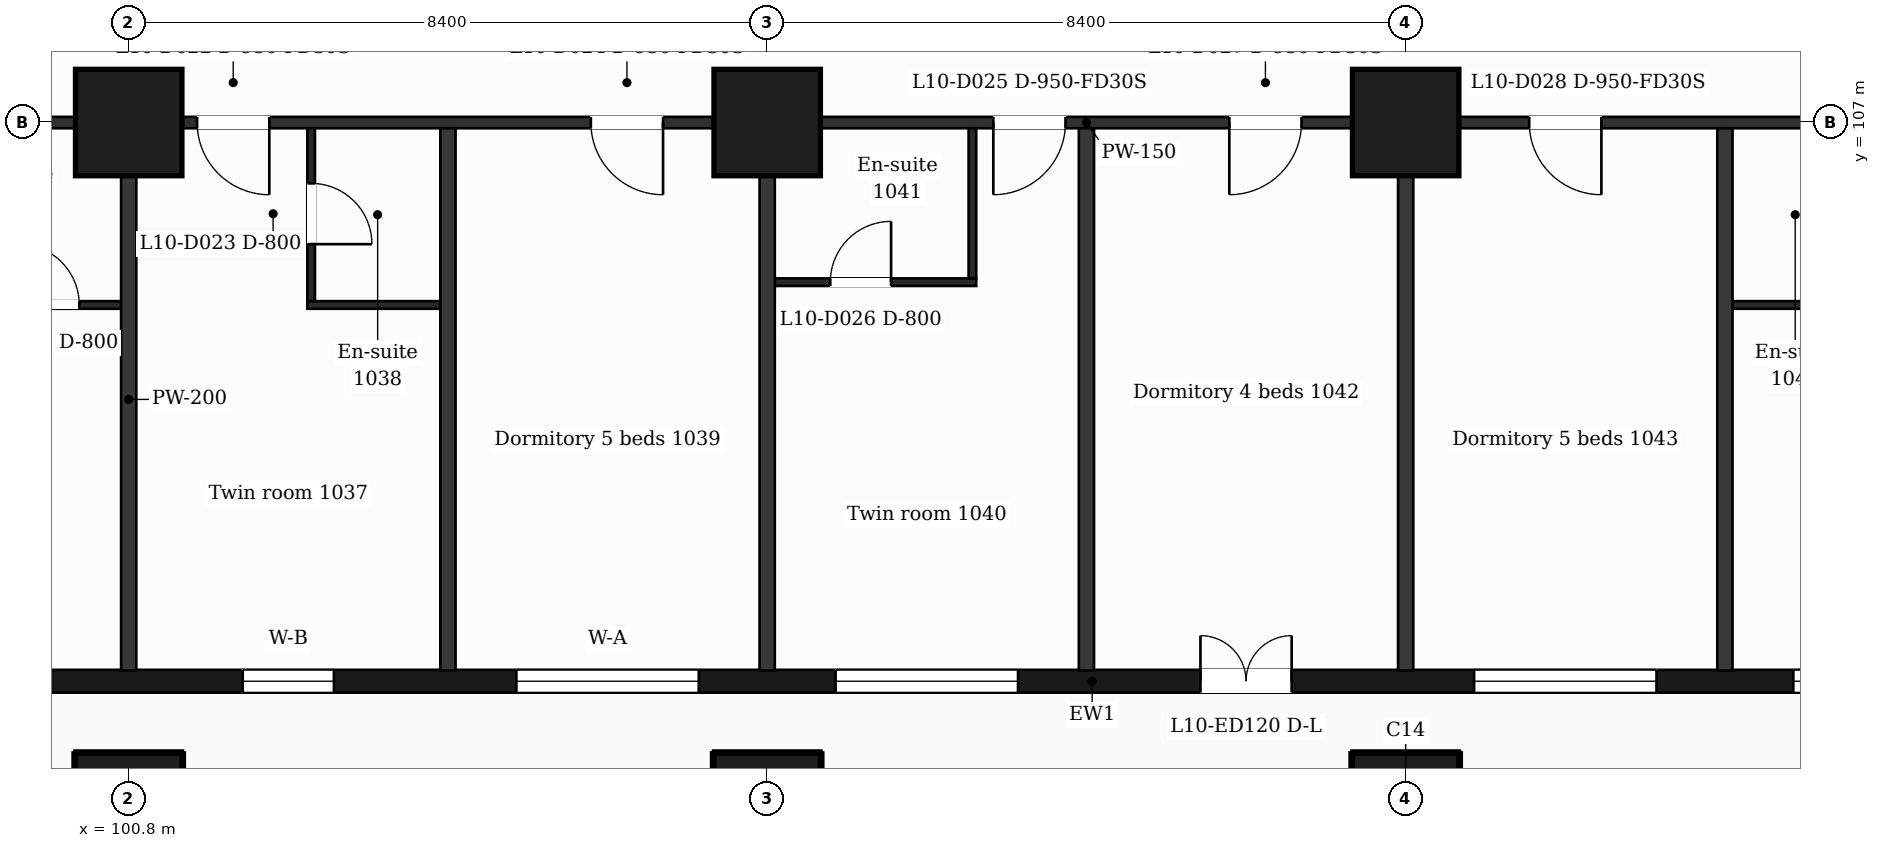
"""IFC4 building model, lengths in metres.
Left out: names, types, materials, properties, quantities, classifications, styles, units other than length and angle.
Written with IfcOpenShell. Run it as: python <this file> out.ifc"""

import sys

from ifc_helpers import new_model, si_unit, direction, frame, frame_2d, origin, origin_2d, place, context, subcontext, project, spatial, rectangle, extrude, element, fill, save


model = new_model("IFC4")
c1 = context("Model", 3, precision=1e-05, world=origin(), true_north=direction((0.0, 1.0)))
c2 = subcontext(c1, "Body", "Model", "MODEL_VIEW")
j1 = project(units=[si_unit("LENGTHUNIT", "METRE"), si_unit("PLANEANGLEUNIT", "RADIAN")], contexts=[c1])
p1 = place(None, origin())
s1 = spatial("IfcSite", under=j1, at=p1, CompositionType="ELEMENT")
p2 = place(p1, origin())
s2 = spatial("IfcBuilding", under=s1, at=p2, CompositionType="ELEMENT")
p3 = place(p2, frame((0.0, 0.0, 53.0)))
s3 = spatial("IfcBuildingStorey", under=s2, at=p3, CompositionType="ELEMENT", Elevation=53.0)
for number, where, z_axis, x_axis in (
    (1, (100.8, 98.0, 0.0), (0.0, 0.0, 1.0), (1.0, 0.0, 0.0)),
    (2, (109.2, 98.0, 0.0), (0.0, 0.0, 1.0), (1.0, 0.0, 0.0)),
    (3, (117.6, 98.0, 0.0), (0.0, 0.0, 1.0), (1.0, 0.0, 0.0)),
    (4, (100.8, 107.0, 0.0), (0.0, 0.0, 1.0), (1.0, 0.0, 0.0)),
    (5, (109.2, 107.0, 0.0), (0.0, 0.0, 1.0), (1.0, 0.0, 0.0)),
    (6, (117.6, 107.0, 0.0), (0.0, 0.0, 1.0), (1.0, 0.0, 0.0)),
):
    element("IfcColumn", number, at=place(p3, frame(where, z_axis=z_axis, x_axis=x_axis)), inside=s3, PredefinedType="COLUMN", context=c2, shape_type="SweptSolid", body=[
        extrude(rectangle(XDim=1.4, YDim=1.4, at=origin_2d()), origin(), (0.0, 0.0, 1.0), 3.5),
    ])
p4 = place(p3, frame((89.85, 99.65, 0.0), z_axis=(0.0, 0.0, 1.0), x_axis=(1.0, 0.0, 0.0)))
e7 = element("IfcWall", 7, at=p4, inside=s3, PredefinedType="SOLIDWALL", context=c2, shape_type="SweptSolid", body=[
    extrude(rectangle(XDim=47.25, YDim=0.3, at=frame_2d((23.625, 0.0))), origin(), (0.0, 0.0, 1.0), 3.18),
])
p5 = place(p4, frame((0.725, 0.0, 0.9)))
e8 = element("IfcOpeningElement", 8, at=p5, cuts=e7, PredefinedType="OPENING", context=c2, shape_type="SweptSolid", body=[
    extrude(rectangle(XDim=1.2, YDim=2.1, at=frame_2d((0.6, 1.05))), frame((0.0, 0.16, 0.0), z_axis=(0.0, -1.0, 0.0), x_axis=(1.0, 0.0, 0.0)), (0.0, 0.0, 1.0), 0.32),
])
p6 = place(p4, frame((3.45, 0.0, 0.9)))
e9 = element("IfcOpeningElement", 9, at=p6, cuts=e7, PredefinedType="OPENING", context=c2, shape_type="SweptSolid", body=[
    extrude(rectangle(XDim=2.4, YDim=2.1, at=frame_2d((1.2, 1.05))), frame((0.0, 0.16, 0.0), z_axis=(0.0, -1.0, 0.0), x_axis=(1.0, 0.0, 0.0)), (0.0, 0.0, 1.0), 0.32),
])
p7 = place(p4, frame((8.25, 0.0, 0.9)))
e10 = element("IfcOpeningElement", 10, at=p7, cuts=e7, PredefinedType="OPENING", context=c2, shape_type="SweptSolid", body=[
    extrude(rectangle(XDim=1.2, YDim=2.1, at=frame_2d((0.6, 1.05))), frame((0.0, 0.16, 0.0), z_axis=(0.0, -1.0, 0.0), x_axis=(1.0, 0.0, 0.0)), (0.0, 0.0, 1.0), 0.32),
])
p8 = place(p4, frame((12.45, 0.0, 0.9)))
e11 = element("IfcOpeningElement", 11, at=p8, cuts=e7, PredefinedType="OPENING", context=c2, shape_type="SweptSolid", body=[
    extrude(rectangle(XDim=1.2, YDim=2.1, at=frame_2d((0.6, 1.05))), frame((0.0, 0.16, 0.0), z_axis=(0.0, -1.0, 0.0), x_axis=(1.0, 0.0, 0.0)), (0.0, 0.0, 1.0), 0.32),
])
p9 = place(p4, frame((16.05, 0.0, 0.9)))
e12 = element("IfcOpeningElement", 12, at=p9, cuts=e7, PredefinedType="OPENING", context=c2, shape_type="SweptSolid", body=[
    extrude(rectangle(XDim=2.4, YDim=2.1, at=frame_2d((1.2, 1.05))), frame((0.0, 0.16, 0.0), z_axis=(0.0, -1.0, 0.0), x_axis=(1.0, 0.0, 0.0)), (0.0, 0.0, 1.0), 0.32),
])
p10 = place(p4, frame((20.25, 0.0, 0.9)))
e13 = element("IfcOpeningElement", 13, at=p10, cuts=e7, PredefinedType="OPENING", context=c2, shape_type="SweptSolid", body=[
    extrude(rectangle(XDim=2.4, YDim=2.1, at=frame_2d((1.2, 1.05))), frame((0.0, 0.16, 0.0), z_axis=(0.0, -1.0, 0.0), x_axis=(1.0, 0.0, 0.0)), (0.0, 0.0, 1.0), 0.32),
])
p11 = place(p4, frame((25.05, 0.0, 0.0)))
e14 = element("IfcOpeningElement", 14, at=p11, cuts=e7, PredefinedType="OPENING", context=c2, shape_type="SweptSolid", body=[
    extrude(rectangle(XDim=1.2, YDim=2.4, at=frame_2d((0.6, 1.2))), frame((0.0, 0.16, 0.0), z_axis=(0.0, -1.0, 0.0), x_axis=(1.0, 0.0, 0.0)), (0.0, 0.0, 1.0), 0.32),
])
p12 = place(p4, frame((28.65, 0.0, 0.9)))
e15 = element("IfcOpeningElement", 15, at=p12, cuts=e7, PredefinedType="OPENING", context=c2, shape_type="SweptSolid", body=[
    extrude(rectangle(XDim=2.4, YDim=2.1, at=frame_2d((1.2, 1.05))), frame((0.0, 0.16, 0.0), z_axis=(0.0, -1.0, 0.0), x_axis=(1.0, 0.0, 0.0)), (0.0, 0.0, 1.0), 0.32),
])
p13 = place(p4, frame((32.85, 0.0, 0.9)))
e16 = element("IfcOpeningElement", 16, at=p13, cuts=e7, PredefinedType="OPENING", context=c2, shape_type="SweptSolid", body=[
    extrude(rectangle(XDim=2.4, YDim=2.1, at=frame_2d((1.2, 1.05))), frame((0.0, 0.16, 0.0), z_axis=(0.0, -1.0, 0.0), x_axis=(1.0, 0.0, 0.0)), (0.0, 0.0, 1.0), 0.32),
])
p14 = place(p4, frame((37.65, 0.0, 0.9)))
e17 = element("IfcOpeningElement", 17, at=p14, cuts=e7, PredefinedType="OPENING", context=c2, shape_type="SweptSolid", body=[
    extrude(rectangle(XDim=1.2, YDim=2.1, at=frame_2d((0.6, 1.05))), frame((0.0, 0.16, 0.0), z_axis=(0.0, -1.0, 0.0), x_axis=(1.0, 0.0, 0.0)), (0.0, 0.0, 1.0), 0.32),
])
p15 = place(p4, frame((41.85, 0.0, 0.9)))
e18 = element("IfcOpeningElement", 18, at=p15, cuts=e7, PredefinedType="OPENING", context=c2, shape_type="SweptSolid", body=[
    extrude(rectangle(XDim=1.2, YDim=2.1, at=frame_2d((0.6, 1.05))), frame((0.0, 0.16, 0.0), z_axis=(0.0, -1.0, 0.0), x_axis=(1.0, 0.0, 0.0)), (0.0, 0.0, 1.0), 0.32),
])
p16 = place(p4, frame((45.25, 0.0, 0.9)))
e19 = element("IfcOpeningElement", 19, at=p16, cuts=e7, PredefinedType="OPENING", context=c2, shape_type="SweptSolid", body=[
    extrude(rectangle(XDim=1.2, YDim=2.1, at=frame_2d((0.6, 1.05))), frame((0.0, 0.16, 0.0), z_axis=(0.0, -1.0, 0.0), x_axis=(1.0, 0.0, 0.0)), (0.0, 0.0, 1.0), 0.32),
])
p17 = place(p3, frame((98.05, 104.6, 0.0), z_axis=(0.0, 0.0, 1.0), x_axis=(1.0, 0.0, 0.0)))
e20 = element("IfcWall", 20, at=p17, inside=s3, PredefinedType="PARTITIONING", context=c2, shape_type="SweptSolid", body=[
    extrude(rectangle(XDim=2.75, YDim=0.1, at=frame_2d((1.375, 0.0))), origin(), (0.0, 0.0, 1.0), 3.18),
])
p18 = place(p17, frame((1.3, 0.0, 0.0)))
e21 = element("IfcOpeningElement", 21, at=p18, cuts=e20, PredefinedType="OPENING", context=c2, shape_type="SweptSolid", body=[
    extrude(rectangle(XDim=0.8, YDim=2.1, at=frame_2d((0.4, 1.05))), frame((0.0, 0.06, 0.0), z_axis=(0.0, -1.0, 0.0), x_axis=(1.0, 0.0, 0.0)), (0.0, 0.0, 1.0), 0.12),
])
p19 = place(p3, frame((103.15, 104.6, 0.0), z_axis=(0.0, 0.0, 1.0), x_axis=(1.0, 0.0, 0.0)))
e22 = element("IfcWall", 22, at=p19, inside=s3, PredefinedType="PARTITIONING", context=c2, shape_type="SweptSolid", body=[
    extrude(rectangle(XDim=1.85, YDim=0.1, at=frame_2d((0.925, 0.0))), origin(), (0.0, 0.0, 1.0), 3.18),
])
p20 = place(p3, frame((121.8, 104.6, 0.0), z_axis=(0.0, 0.0, 1.0), x_axis=(1.0, 0.0, 0.0)))
e23 = element("IfcWall", 23, at=p20, inside=s3, PredefinedType="PARTITIONING", context=c2, shape_type="SweptSolid", body=[
    extrude(rectangle(XDim=1.85, YDim=0.1, at=frame_2d((0.925, 0.0))), origin(), (0.0, 0.0, 1.0), 3.18),
])
p21 = place(p3, frame((109.2, 104.9, 0.0), z_axis=(0.0, 0.0, 1.0), x_axis=(1.0, 0.0, 0.0)))
e24 = element("IfcWall", 24, at=p21, inside=s3, PredefinedType="PARTITIONING", context=c2, shape_type="SweptSolid", body=[
    extrude(rectangle(XDim=2.75, YDim=0.1, at=frame_2d((1.375, 0.0))), origin(), (0.0, 0.0, 1.0), 3.18),
])
p22 = place(p21, frame((0.83, 0.0, 0.0)))
e25 = element("IfcOpeningElement", 25, at=p22, cuts=e24, PredefinedType="OPENING", context=c2, shape_type="SweptSolid", body=[
    extrude(rectangle(XDim=0.8, YDim=2.1, at=frame_2d((0.4, 1.05))), frame((0.0, 0.06, 0.0), z_axis=(0.0, -1.0, 0.0), x_axis=(1.0, 0.0, 0.0)), (0.0, 0.0, 1.0), 0.12),
])
p23 = place(p3, frame((87.018, 107.0, 0.0), z_axis=(0.0, 0.0, 1.0), x_axis=(1.0, 0.0, 0.0)))
e26 = element("IfcWall", 26, at=p23, inside=s3, PredefinedType="PARTITIONING", context=c2, shape_type="SweptSolid", body=[
    extrude(rectangle(XDim=52.765, YDim=0.15, at=frame_2d((26.382, 0.0))), origin(), (0.0, 0.0, 1.0), 3.18),
])
p24 = place(p23, frame((0.87, 0.0, 0.0)))
e27 = element("IfcOpeningElement", 27, at=p24, cuts=e26, PredefinedType="OPENING", context=c2, shape_type="SweptSolid", body=[
    extrude(rectangle(XDim=0.95, YDim=2.1, at=frame_2d((0.475, 1.05))), frame((0.0, 0.085, 0.0), z_axis=(0.0, -1.0, 0.0), x_axis=(1.0, 0.0, 0.0)), (0.0, 0.0, 1.0), 0.17),
])
p25 = place(p23, frame((6.752, 0.0, 0.0)))
e28 = element("IfcOpeningElement", 28, at=p25, cuts=e26, PredefinedType="OPENING", context=c2, shape_type="SweptSolid", body=[
    extrude(rectangle(XDim=0.95, YDim=2.1, at=frame_2d((0.475, 1.05))), frame((0.0, 0.085, 0.0), z_axis=(0.0, -1.0, 0.0), x_axis=(1.0, 0.0, 0.0)), (0.0, 0.0, 1.0), 0.17),
])
p26 = place(p23, frame((9.857, 0.0, 0.0)))
e29 = element("IfcOpeningElement", 29, at=p26, cuts=e26, PredefinedType="OPENING", context=c2, shape_type="SweptSolid", body=[
    extrude(rectangle(XDim=0.95, YDim=2.1, at=frame_2d((0.475, 1.05))), frame((0.0, 0.085, 0.0), z_axis=(0.0, -1.0, 0.0), x_axis=(1.0, 0.0, 0.0)), (0.0, 0.0, 1.0), 0.17),
])
p27 = place(p23, frame((14.682, 0.0, 0.0)))
e30 = element("IfcOpeningElement", 30, at=p27, cuts=e26, PredefinedType="OPENING", context=c2, shape_type="SweptSolid", body=[
    extrude(rectangle(XDim=0.95, YDim=2.1, at=frame_2d((0.475, 1.05))), frame((0.0, 0.085, 0.0), z_axis=(0.0, -1.0, 0.0), x_axis=(1.0, 0.0, 0.0)), (0.0, 0.0, 1.0), 0.17),
])
p28 = place(p23, frame((19.862, 0.0, 0.0)))
e31 = element("IfcOpeningElement", 31, at=p28, cuts=e26, PredefinedType="OPENING", context=c2, shape_type="SweptSolid", body=[
    extrude(rectangle(XDim=0.95, YDim=2.1, at=frame_2d((0.475, 1.05))), frame((0.0, 0.085, 0.0), z_axis=(0.0, -1.0, 0.0), x_axis=(1.0, 0.0, 0.0)), (0.0, 0.0, 1.0), 0.17),
])
p29 = place(p23, frame((25.157, 0.0, 0.0)))
e32 = element("IfcOpeningElement", 32, at=p29, cuts=e26, PredefinedType="OPENING", context=c2, shape_type="SweptSolid", body=[
    extrude(rectangle(XDim=0.95, YDim=2.1, at=frame_2d((0.475, 1.05))), frame((0.0, 0.085, 0.0), z_axis=(0.0, -1.0, 0.0), x_axis=(1.0, 0.0, 0.0)), (0.0, 0.0, 1.0), 0.17),
])
p30 = place(p23, frame((28.262, 0.0, 0.0)))
e33 = element("IfcOpeningElement", 33, at=p30, cuts=e26, PredefinedType="OPENING", context=c2, shape_type="SweptSolid", body=[
    extrude(rectangle(XDim=0.95, YDim=2.1, at=frame_2d((0.475, 1.05))), frame((0.0, 0.085, 0.0), z_axis=(0.0, -1.0, 0.0), x_axis=(1.0, 0.0, 0.0)), (0.0, 0.0, 1.0), 0.17),
])
p31 = place(p23, frame((32.207, 0.0, 0.0)))
e34 = element("IfcOpeningElement", 34, at=p31, cuts=e26, PredefinedType="OPENING", context=c2, shape_type="SweptSolid", body=[
    extrude(rectangle(XDim=0.95, YDim=2.1, at=frame_2d((0.475, 1.05))), frame((0.0, 0.085, 0.0), z_axis=(0.0, -1.0, 0.0), x_axis=(1.0, 0.0, 0.0)), (0.0, 0.0, 1.0), 0.17),
])
p32 = place(p23, frame((37.094, 0.0, 0.0)))
e35 = element("IfcOpeningElement", 35, at=p32, cuts=e26, PredefinedType="OPENING", context=c2, shape_type="SweptSolid", body=[
    extrude(rectangle(XDim=0.95, YDim=2.1, at=frame_2d((0.475, 1.05))), frame((0.0, 0.085, 0.0), z_axis=(0.0, -1.0, 0.0), x_axis=(1.0, 0.0, 0.0)), (0.0, 0.0, 1.0), 0.17),
])
p33 = place(p23, frame((43.045, 0.0, 0.0)))
e36 = element("IfcOpeningElement", 36, at=p33, cuts=e26, PredefinedType="OPENING", context=c2, shape_type="SweptSolid", body=[
    extrude(rectangle(XDim=0.95, YDim=2.1, at=frame_2d((0.475, 1.05))), frame((0.0, 0.085, 0.0), z_axis=(0.0, -1.0, 0.0), x_axis=(1.0, 0.0, 0.0)), (0.0, 0.0, 1.0), 0.17),
])
p34 = place(p23, frame((49.285, 0.0, 0.0)))
e37 = element("IfcOpeningElement", 37, at=p34, cuts=e26, PredefinedType="OPENING", context=c2, shape_type="SweptSolid", body=[
    extrude(rectangle(XDim=0.95, YDim=2.1, at=frame_2d((0.475, 1.05))), frame((0.0, 0.085, 0.0), z_axis=(0.0, -1.0, 0.0), x_axis=(1.0, 0.0, 0.0)), (0.0, 0.0, 1.0), 0.17),
])
p35 = place(p3, frame((100.8, 99.79, 0.0), z_axis=(0.0, 0.0, 1.0), x_axis=(0.0, 1.0, 0.0)))
e38 = element("IfcWall", 38, at=p35, inside=s3, PredefinedType="PARTITIONING", context=c2, shape_type="SweptSolid", body=[
    extrude(rectangle(XDim=7.135, YDim=0.2, at=frame_2d((3.567, 0.0))), origin(), (0.0, 0.0, 1.0), 3.18),
])
p36 = place(p3, frame((103.2, 104.65, 0.0), z_axis=(0.0, 0.0, 1.0), x_axis=(0.0, 1.0, 0.0)))
e39 = element("IfcWall", 39, at=p36, inside=s3, PredefinedType="PARTITIONING", context=c2, shape_type="SweptSolid", body=[
    extrude(rectangle(XDim=2.275, YDim=0.1, at=frame_2d((1.138, 0.0))), origin(), (0.0, 0.0, 1.0), 3.18),
])
p37 = place(p36, frame((0.75, 0.0, 0.0)))
e40 = element("IfcOpeningElement", 40, at=p37, cuts=e39, PredefinedType="OPENING", context=c2, shape_type="SweptSolid", body=[
    extrude(rectangle(XDim=0.8, YDim=2.1, at=frame_2d((0.4, 1.05))), frame((0.0, 0.06, 0.0), z_axis=(0.0, -1.0, 0.0), x_axis=(1.0, 0.0, 0.0)), (0.0, 0.0, 1.0), 0.12),
])
for number, where, z_axis, x_axis in (
    (41, (105.0, 99.79, 0.0), (0.0, 0.0, 1.0), (0.0, 1.0, 0.0)),
    (42, (109.2, 99.79, 0.0), (0.0, 0.0, 1.0), (0.0, 1.0, 0.0)),
):
    element("IfcWall", number, at=place(p3, frame(where, z_axis=z_axis, x_axis=x_axis)), inside=s3, PredefinedType="PARTITIONING", context=c2, shape_type="SweptSolid", body=[
        extrude(rectangle(XDim=7.135, YDim=0.2, at=frame_2d((3.567, 0.0))), origin(), (0.0, 0.0, 1.0), 3.18),
    ])
p38 = place(p3, frame((111.9, 104.95, 0.0), z_axis=(0.0, 0.0, 1.0), x_axis=(0.0, 1.0, 0.0)))
e43 = element("IfcWall", 43, at=p38, inside=s3, PredefinedType="PARTITIONING", context=c2, shape_type="SweptSolid", body=[
    extrude(rectangle(XDim=1.975, YDim=0.1, at=frame_2d((0.988, 0.0))), origin(), (0.0, 0.0, 1.0), 3.18),
])
for number, where, z_axis, x_axis in (
    (44, (113.4, 99.79, 0.0), (0.0, 0.0, 1.0), (0.0, 1.0, 0.0)),
    (45, (117.6, 99.79, 0.0), (0.0, 0.0, 1.0), (0.0, 1.0, 0.0)),
    (46, (121.8, 99.79, 0.0), (0.0, 0.0, 1.0), (0.0, 1.0, 0.0)),
):
    element("IfcWall", number, at=place(p3, frame(where, z_axis=z_axis, x_axis=x_axis)), inside=s3, PredefinedType="PARTITIONING", context=c2, shape_type="SweptSolid", body=[
        extrude(rectangle(XDim=7.135, YDim=0.2, at=frame_2d((3.567, 0.0))), origin(), (0.0, 0.0, 1.0), 3.18),
    ])
p39 = place(p8, origin())
e47 = element("IfcWindow", 47, at=p39, inside=s3, PartitioningType="SINGLE_PANEL", PredefinedType="WINDOW", context=c2, shape_type="SweptSolid", body=[
    extrude(rectangle(XDim=1.2, YDim=2.1, at=frame_2d((0.6, 1.05))), frame((0.0, 0.03, 0.0), z_axis=(0.0, -1.0, 0.0), x_axis=(1.0, 0.0, 0.0)), (0.0, 0.0, 1.0), 0.06),
])
fill(e11, e47)
p40 = place(p9, origin())
e48 = element("IfcWindow", 48, at=p40, inside=s3, PartitioningType="SINGLE_PANEL", PredefinedType="WINDOW", context=c2, shape_type="SweptSolid", body=[
    extrude(rectangle(XDim=2.4, YDim=2.1, at=frame_2d((1.2, 1.05))), frame((0.0, 0.03, 0.0), z_axis=(0.0, -1.0, 0.0), x_axis=(1.0, 0.0, 0.0)), (0.0, 0.0, 1.0), 0.06),
])
fill(e12, e48)
p41 = place(p10, origin())
e49 = element("IfcWindow", 49, at=p41, inside=s3, PartitioningType="SINGLE_PANEL", PredefinedType="WINDOW", context=c2, shape_type="SweptSolid", body=[
    extrude(rectangle(XDim=2.4, YDim=2.1, at=frame_2d((1.2, 1.05))), frame((0.0, 0.03, 0.0), z_axis=(0.0, -1.0, 0.0), x_axis=(1.0, 0.0, 0.0)), (0.0, 0.0, 1.0), 0.06),
])
fill(e13, e49)
p42 = place(p11, origin())
e50 = element("IfcDoor", 50, at=p42, inside=s3, OperationType="DOUBLE_DOOR_SINGLE_SWING", PredefinedType="DOOR", context=c2, shape_type="SweptSolid", body=[
    extrude(rectangle(XDim=1.2, YDim=2.4, at=frame_2d((0.6, 1.2))), frame((0.0, 0.025, 0.0), z_axis=(0.0, -1.0, 0.0), x_axis=(1.0, 0.0, 0.0)), (0.0, 0.0, 1.0), 0.05),
])
fill(e14, e50)
p43 = place(p12, origin())
e51 = element("IfcWindow", 51, at=p43, inside=s3, PartitioningType="SINGLE_PANEL", PredefinedType="WINDOW", context=c2, shape_type="SweptSolid", body=[
    extrude(rectangle(XDim=2.4, YDim=2.1, at=frame_2d((1.2, 1.05))), frame((0.0, 0.03, 0.0), z_axis=(0.0, -1.0, 0.0), x_axis=(1.0, 0.0, 0.0)), (0.0, 0.0, 1.0), 0.06),
])
fill(e15, e51)
p44 = place(p13, origin())
e52 = element("IfcWindow", 52, at=p44, inside=s3, PartitioningType="SINGLE_PANEL", PredefinedType="WINDOW", context=c2, shape_type="SweptSolid", body=[
    extrude(rectangle(XDim=2.4, YDim=2.1, at=frame_2d((1.2, 1.05))), frame((0.0, 0.03, 0.0), z_axis=(0.0, -1.0, 0.0), x_axis=(1.0, 0.0, 0.0)), (0.0, 0.0, 1.0), 0.06),
])
fill(e16, e52)
p45 = place(p18, origin())
e53 = element("IfcDoor", 53, at=p45, inside=s3, OperationType="SINGLE_SWING_LEFT", PredefinedType="DOOR", context=c2, shape_type="SweptSolid", body=[
    extrude(rectangle(XDim=0.8, YDim=2.1, at=frame_2d((0.4, 1.05))), frame((0.0, 0.025, 0.0), z_axis=(0.0, -1.0, 0.0), x_axis=(1.0, 0.0, 0.0)), (0.0, 0.0, 1.0), 0.05),
])
fill(e21, e53)
p46 = place(p27, origin())
e54 = element("IfcDoor", 54, at=p46, inside=s3, OperationType="SINGLE_SWING_RIGHT", PredefinedType="DOOR", context=c2, shape_type="SweptSolid", body=[
    extrude(rectangle(XDim=0.95, YDim=2.1, at=frame_2d((0.475, 1.05))), frame((0.0, 0.025, 0.0), z_axis=(0.0, -1.0, 0.0), x_axis=(1.0, 0.0, 0.0)), (0.0, 0.0, 1.0), 0.05),
])
fill(e30, e54)
p47 = place(p37, origin())
e55 = element("IfcDoor", 55, at=p47, inside=s3, OperationType="SINGLE_SWING_LEFT", PredefinedType="DOOR", context=c2, shape_type="SweptSolid", body=[
    extrude(rectangle(XDim=0.8, YDim=2.1, at=frame_2d((0.4, 1.05))), frame((0.0, 0.025, 0.0), z_axis=(0.0, -1.0, 0.0), x_axis=(1.0, 0.0, 0.0)), (0.0, 0.0, 1.0), 0.05),
])
fill(e40, e55)
p48 = place(p28, origin())
e56 = element("IfcDoor", 56, at=p48, inside=s3, OperationType="SINGLE_SWING_RIGHT", PredefinedType="DOOR", context=c2, shape_type="SweptSolid", body=[
    extrude(rectangle(XDim=0.95, YDim=2.1, at=frame_2d((0.475, 1.05))), frame((0.0, 0.025, 0.0), z_axis=(0.0, -1.0, 0.0), x_axis=(1.0, 0.0, 0.0)), (0.0, 0.0, 1.0), 0.05),
])
fill(e31, e56)
p49 = place(p29, origin())
e57 = element("IfcDoor", 57, at=p49, inside=s3, OperationType="SINGLE_SWING_LEFT", PredefinedType="DOOR", context=c2, shape_type="SweptSolid", body=[
    extrude(rectangle(XDim=0.95, YDim=2.1, at=frame_2d((0.475, 1.05))), frame((0.0, 0.025, 0.0), z_axis=(0.0, -1.0, 0.0), x_axis=(1.0, 0.0, 0.0)), (0.0, 0.0, 1.0), 0.05),
])
fill(e32, e57)
p50 = place(p22, origin())
e58 = element("IfcDoor", 58, at=p50, inside=s3, OperationType="SINGLE_SWING_RIGHT", PredefinedType="DOOR", context=c2, shape_type="SweptSolid", body=[
    extrude(rectangle(XDim=0.8, YDim=2.1, at=frame_2d((0.4, 1.05))), frame((0.0, 0.025, 0.0), z_axis=(0.0, -1.0, 0.0), x_axis=(1.0, 0.0, 0.0)), (0.0, 0.0, 1.0), 0.05),
])
fill(e25, e58)
p51 = place(p30, origin())
e59 = element("IfcDoor", 59, at=p51, inside=s3, OperationType="SINGLE_SWING_LEFT", PredefinedType="DOOR", context=c2, shape_type="SweptSolid", body=[
    extrude(rectangle(XDim=0.95, YDim=2.1, at=frame_2d((0.475, 1.05))), frame((0.0, 0.025, 0.0), z_axis=(0.0, -1.0, 0.0), x_axis=(1.0, 0.0, 0.0)), (0.0, 0.0, 1.0), 0.05),
])
fill(e33, e59)
p52 = place(p31, origin())
e60 = element("IfcDoor", 60, at=p52, inside=s3, OperationType="SINGLE_SWING_RIGHT", PredefinedType="DOOR", context=c2, shape_type="SweptSolid", body=[
    extrude(rectangle(XDim=0.95, YDim=2.1, at=frame_2d((0.475, 1.05))), frame((0.0, 0.025, 0.0), z_axis=(0.0, -1.0, 0.0), x_axis=(1.0, 0.0, 0.0)), (0.0, 0.0, 1.0), 0.05),
])
fill(e34, e60)
save(model, sys.argv[1])
